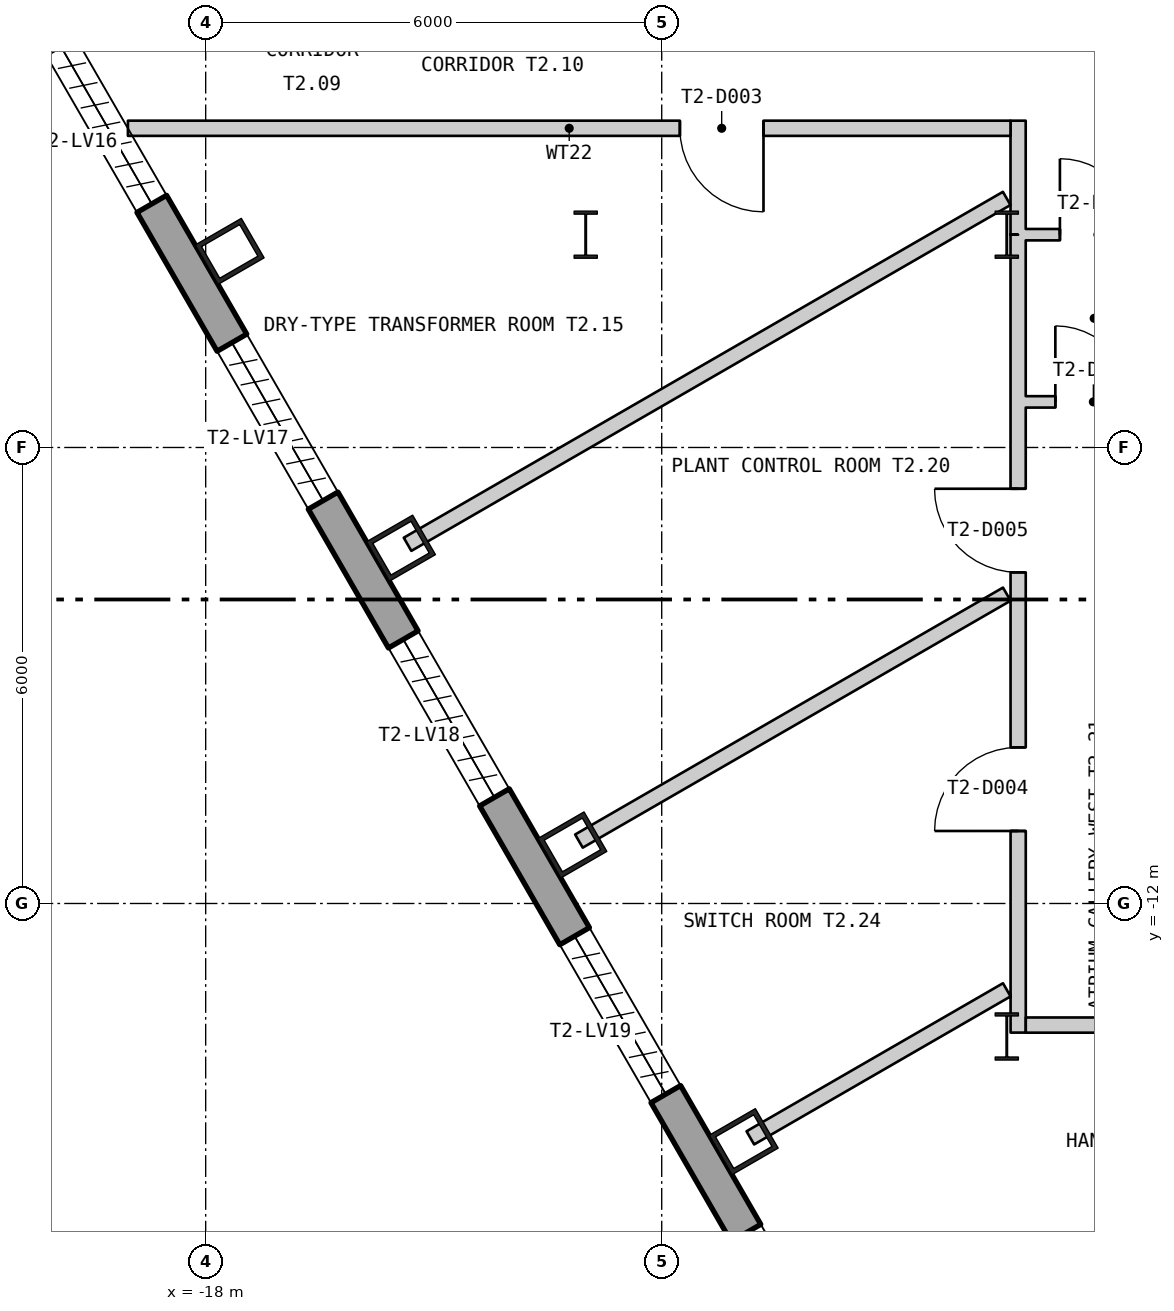
"""IFC4 building model, lengths in metres.
Left out: names, types, materials, properties, quantities, classifications, styles, units other than length and angle.
Written with IfcOpenShell. Run it as: python <this file> out.ifc"""

import sys

from ifc_helpers import new_model, si_unit, direction, frame, frame_2d, origin, origin_2d, place, context, subcontext, project, spatial, polyline, rectangle, hollow_rectangle, i_section, outline, extrude, element, fill, save


model = new_model("IFC4")
c1 = context("Model", 3, precision=1e-05, world=origin(), true_north=direction((0.0, 1.0)))
c2 = subcontext(c1, "Body", "Model", "MODEL_VIEW")
j1 = project(units=[si_unit("LENGTHUNIT", "METRE"), si_unit("PLANEANGLEUNIT", "RADIAN")], contexts=[c1])
p1 = place(None, origin())
s1 = spatial("IfcSite", under=j1, at=p1, CompositionType="ELEMENT")
p2 = place(p1, origin())
s2 = spatial("IfcBuilding", under=s1, at=p2, CompositionType="ELEMENT")
p3 = place(p2, frame((0.0, 0.0, 133.8)))
s3 = spatial("IfcBuildingStorey", under=s2, at=p3, CompositionType="ELEMENT", Elevation=133.8)
for number, where, z_axis, x_axis in (
    (1, (-17.684, -3.42, 0.0), (0.0, 0.0, 1.0), (0.5, -0.866, 0.0)),
    (2, (-15.43, -7.325, 0.0), (0.0, 0.0, 1.0), (0.5, -0.866, 0.0)),
    (3, (-13.175, -11.23, 0.0), (0.0, 0.0, 1.0), (0.5, -0.866, 0.0)),
    (4, (-10.921, -15.134, 0.0), (0.0, 0.0, 1.0), (0.5, -0.866, 0.0)),
):
    element("IfcColumn", number, at=place(p3, frame(where, z_axis=z_axis, x_axis=x_axis)), inside=s3, PredefinedType="COLUMN", context=c2, shape_type="SweptSolid", body=[
        extrude(hollow_rectangle(XDim=0.6, YDim=0.7, WallThickness=0.06, at=origin_2d()), origin(), (0.0, 0.0, 1.0), 6.0),
    ])
for number, where, z_axis, x_axis in (
    (5, (-7.46, -3.2, 0.0), (0.0, 0.0, 1.0), (1.0, 0.0, 0.0)),
    (6, (-7.46, -13.75, 0.0), (0.0, 0.0, 1.0), (1.0, 0.0, 0.0)),
    (7, (-13.0, -3.2, 0.0), (0.0, 0.0, 1.0), (1.0, 0.0, 0.0)),
):
    element("IfcColumn", number, at=place(p3, frame(where, z_axis=z_axis, x_axis=x_axis)), inside=s3, PredefinedType="COLUMN", context=c2, shape_type="SweptSolid", body=[
        extrude(i_section(OverallWidth=0.305, OverallDepth=0.62, WebThickness=0.021, FlangeThickness=0.04, at=origin_2d()), origin(), (0.0, 0.0, 1.0), 6.0),
    ])
p4 = place(p3, frame((-27.365, 12.198, -0.18), z_axis=(0.0, 0.0, 1.0), x_axis=(0.500000335318, -0.866025210188, 0.0)))
e8 = element("IfcWall", 8, at=p4, inside=s3, PredefinedType="SOLIDWALL", context=c2, shape_type="SweptSolid", body=[
    extrude(outline(polyline([(-0.13, -0.225), (45.88, -0.225), (45.62, 0.225), (0.13, 0.225), (-0.13, -0.225)])), origin(), (0.0, 0.0, 1.0), 6.0),
])
p5 = place(p4, frame((1.425, 0.0, 1.38)))
e9 = element("IfcOpeningElement", 9, at=p5, cuts=e8, PredefinedType="OPENING", context=c2, shape_type="SweptSolid", body=[
    extrude(rectangle(XDim=2.4, YDim=3.6, at=frame_2d((1.2, 1.8))), frame((0.0, 0.235, 0.0), z_axis=(0.0, -1.0, 0.0), x_axis=(1.0, 0.0, 0.0)), (0.0, 0.0, 1.0), 0.47),
])
p6 = place(p4, frame((5.895, 0.0, 1.38)))
e10 = element("IfcOpeningElement", 10, at=p6, cuts=e8, PredefinedType="OPENING", context=c2, shape_type="SweptSolid", body=[
    extrude(rectangle(XDim=2.4, YDim=3.6, at=frame_2d((1.2, 1.8))), frame((0.0, 0.235, 0.0), z_axis=(0.0, -1.0, 0.0), x_axis=(1.0, 0.0, 0.0)), (0.0, 0.0, 1.0), 0.47),
])
p7 = place(p4, frame((10.403, 0.0, 1.38)))
e11 = element("IfcOpeningElement", 11, at=p7, cuts=e8, PredefinedType="OPENING", context=c2, shape_type="SweptSolid", body=[
    extrude(rectangle(XDim=2.4, YDim=3.6, at=frame_2d((1.2, 1.8))), frame((0.0, 0.235, 0.0), z_axis=(0.0, -1.0, 0.0), x_axis=(1.0, 0.0, 0.0)), (0.0, 0.0, 1.0), 0.47),
])
p8 = place(p4, frame((14.912, 0.0, 1.38)))
e12 = element("IfcOpeningElement", 12, at=p8, cuts=e8, PredefinedType="OPENING", context=c2, shape_type="SweptSolid", body=[
    extrude(rectangle(XDim=2.4, YDim=3.6, at=frame_2d((1.2, 1.8))), frame((0.0, 0.235, 0.0), z_axis=(0.0, -1.0, 0.0), x_axis=(1.0, 0.0, 0.0)), (0.0, 0.0, 1.0), 0.47),
])
p9 = place(p4, frame((19.421, 0.0, 1.38)))
e13 = element("IfcOpeningElement", 13, at=p9, cuts=e8, PredefinedType="OPENING", context=c2, shape_type="SweptSolid", body=[
    extrude(rectangle(XDim=2.4, YDim=3.6, at=frame_2d((1.2, 1.8))), frame((0.0, 0.235, 0.0), z_axis=(0.0, -1.0, 0.0), x_axis=(1.0, 0.0, 0.0)), (0.0, 0.0, 1.0), 0.47),
])
p10 = place(p4, frame((23.929, 0.0, 1.38)))
e14 = element("IfcOpeningElement", 14, at=p10, cuts=e8, PredefinedType="OPENING", context=c2, shape_type="SweptSolid", body=[
    extrude(rectangle(XDim=2.4, YDim=3.6, at=frame_2d((1.2, 1.8))), frame((0.0, 0.235, 0.0), z_axis=(0.0, -1.0, 0.0), x_axis=(1.0, 0.0, 0.0)), (0.0, 0.0, 1.0), 0.47),
])
p11 = place(p4, frame((28.438, 0.0, 1.38)))
e15 = element("IfcOpeningElement", 15, at=p11, cuts=e8, PredefinedType="OPENING", context=c2, shape_type="SweptSolid", body=[
    extrude(rectangle(XDim=2.4, YDim=3.6, at=frame_2d((1.2, 1.8))), frame((0.0, 0.235, 0.0), z_axis=(0.0, -1.0, 0.0), x_axis=(1.0, 0.0, 0.0)), (0.0, 0.0, 1.0), 0.47),
])
p12 = place(p4, frame((32.947, 0.0, 1.38)))
e16 = element("IfcOpeningElement", 16, at=p12, cuts=e8, PredefinedType="OPENING", context=c2, shape_type="SweptSolid", body=[
    extrude(rectangle(XDim=2.4, YDim=3.6, at=frame_2d((1.2, 1.8))), frame((0.0, 0.235, 0.0), z_axis=(0.0, -1.0, 0.0), x_axis=(1.0, 0.0, 0.0)), (0.0, 0.0, 1.0), 0.47),
])
p13 = place(p4, frame((37.455, 0.0, 1.38)))
e17 = element("IfcOpeningElement", 17, at=p13, cuts=e8, PredefinedType="OPENING", context=c2, shape_type="SweptSolid", body=[
    extrude(rectangle(XDim=2.4, YDim=3.6, at=frame_2d((1.2, 1.8))), frame((0.0, 0.235, 0.0), z_axis=(0.0, -1.0, 0.0), x_axis=(1.0, 0.0, 0.0)), (0.0, 0.0, 1.0), 0.47),
])
p14 = place(p4, frame((41.925, 0.0, 1.38)))
e18 = element("IfcOpeningElement", 18, at=p14, cuts=e8, PredefinedType="OPENING", context=c2, shape_type="SweptSolid", body=[
    extrude(rectangle(XDim=2.4, YDim=3.6, at=frame_2d((1.2, 1.8))), frame((0.0, 0.235, 0.0), z_axis=(0.0, -1.0, 0.0), x_axis=(1.0, 0.0, 0.0)), (0.0, 0.0, 1.0), 0.47),
])
p15 = place(p3, frame((-19.023, -1.8, 0.0), z_axis=(0.0, 0.0, 1.0), x_axis=(1.0, 0.0, 0.0)))
e19 = element("IfcWall", 19, at=p15, inside=s3, PredefinedType="PARTITIONING", context=c2, shape_type="SweptSolid", body=[
    extrude(rectangle(XDim=11.612, YDim=0.2, at=frame_2d((5.806, 0.0))), origin(), (0.0, 0.0, 1.0), 5.8),
])
p16 = place(p15, frame((7.262, 0.0, 0.0)))
e20 = element("IfcOpeningElement", 20, at=p16, cuts=e19, PredefinedType="OPENING", context=c2, shape_type="SweptSolid", body=[
    extrude(rectangle(XDim=1.1, YDim=2.1, at=frame_2d((0.55, 1.05))), frame((0.0, 0.11, 0.0), z_axis=(0.0, -1.0, 0.0), x_axis=(1.0, 0.0, 0.0)), (0.0, 0.0, 1.0), 0.22),
])
p17 = place(p3, frame((-15.344, -7.274, 0.0), z_axis=(0.0, 0.0, 1.0), x_axis=(0.866037399706, 0.499979221878, 0.0)))
e21 = element("IfcWall", 21, at=p17, inside=s3, PredefinedType="PARTITIONING", context=c2, shape_type="SweptSolid", body=[
    extrude(rectangle(XDim=9.102, YDim=0.2, at=frame_2d((4.551, 0.0))), origin(), (0.0, 0.0, 1.0), 5.8),
])
p18 = place(p3, frame((-13.089, -11.179, 0.0), z_axis=(0.0, 0.0, 1.0), x_axis=(0.866085669847, 0.499895601587, 0.0)))
e22 = element("IfcWall", 22, at=p18, inside=s3, PredefinedType="PARTITIONING", context=c2, shape_type="SweptSolid", body=[
    extrude(rectangle(XDim=6.499, YDim=0.2, at=frame_2d((3.25, 0.0))), origin(), (0.0, 0.0, 1.0), 5.8),
])
p19 = place(p3, frame((-10.834, -15.084, 0.0), z_axis=(0.0, 0.0, 1.0), x_axis=(0.866023159588, 0.500003887042, 0.0)))
e23 = element("IfcWall", 23, at=p19, inside=s3, PredefinedType="PARTITIONING", context=c2, shape_type="SweptSolid", body=[
    extrude(rectangle(XDim=3.896, YDim=0.2, at=frame_2d((1.948, 0.0))), origin(), (0.0, 0.0, 1.0), 5.8),
])
p20 = place(p3, frame((-7.31, -13.699, 0.0), z_axis=(0.0, 0.0, 1.0), x_axis=(-8.5722449e-05, 0.999999996326, 0.0)))
e24 = element("IfcWall", 24, at=p20, inside=s3, PredefinedType="PARTITIONING", context=c2, shape_type="SweptSolid", body=[
    extrude(rectangle(XDim=10.499, YDim=0.2, at=frame_2d((5.25, 0.0))), origin(), (0.0, 0.0, 1.0), 5.21),
])
p21 = place(p20, frame((2.653, 0.0, 0.0)))
e25 = element("IfcOpeningElement", 25, at=p21, cuts=e24, PredefinedType="OPENING", context=c2, shape_type="SweptSolid", body=[
    extrude(rectangle(XDim=1.1, YDim=2.1, at=frame_2d((0.55, 1.05))), frame((0.0, 0.11, 0.0), z_axis=(0.0, -1.0, 0.0), x_axis=(1.0, 0.0, 0.0)), (0.0, 0.0, 1.0), 0.22),
])
p22 = place(p20, frame((6.056, 0.0, 0.0)))
e26 = element("IfcOpeningElement", 26, at=p22, cuts=e24, PredefinedType="OPENING", context=c2, shape_type="SweptSolid", body=[
    extrude(rectangle(XDim=1.1, YDim=2.1, at=frame_2d((0.55, 1.05))), frame((0.0, 0.11, 0.0), z_axis=(0.0, -1.0, 0.0), x_axis=(1.0, 0.0, 0.0)), (0.0, 0.0, 1.0), 0.22),
])
p23 = place(p3, frame((-7.311, -3.2, 0.0), z_axis=(0.0, 0.0, 1.0), x_axis=(-6.6666667e-05, 0.999999997778, 0.0)))
e27 = element("IfcWall", 27, at=p23, inside=s3, PredefinedType="PARTITIONING", context=c2, shape_type="SweptSolid", body=[
    extrude(rectangle(XDim=1.5, YDim=0.2, at=frame_2d((0.75, 0.0))), origin(), (0.0, 0.0, 1.0), 5.8),
])
p24 = place(p3, frame((-7.211, -3.2, 0.0), z_axis=(0.0, 0.0, 1.0), x_axis=(1.0, 0.0, 0.0)))
e28 = element("IfcWall", 28, at=p24, inside=s3, PredefinedType="PARTITIONING", context=c2, shape_type="SweptSolid", body=[
    extrude(rectangle(XDim=1.975, YDim=0.15, at=frame_2d((0.988, 0.0))), origin(), (0.0, 0.0, 1.0), 4.89),
])
p25 = place(p24, frame((0.45, 0.0, 0.0)))
e29 = element("IfcOpeningElement", 29, at=p25, cuts=e28, PredefinedType="OPENING", context=c2, shape_type="SweptSolid", body=[
    extrude(rectangle(XDim=1.0, YDim=2.1, at=frame_2d((0.5, 1.05))), frame((0.0, 0.085, 0.0), z_axis=(0.0, -1.0, 0.0), x_axis=(1.0, 0.0, 0.0)), (0.0, 0.0, 1.0), 0.17),
])
p26 = place(p3, frame((-7.211, -5.4, 0.0), z_axis=(0.0, 0.0, 1.0), x_axis=(1.0, 0.0, 0.0)))
e30 = element("IfcWall", 30, at=p26, inside=s3, PredefinedType="PARTITIONING", context=c2, shape_type="SweptSolid", body=[
    extrude(rectangle(XDim=1.781, YDim=0.15, at=frame_2d((0.89, 0.0))), origin(), (0.0, 0.0, 1.0), 5.8),
])
p27 = place(p26, frame((0.39, 0.0, 0.0)))
e31 = element("IfcOpeningElement", 31, at=p27, cuts=e30, PredefinedType="OPENING", context=c2, shape_type="SweptSolid", body=[
    extrude(rectangle(XDim=1.0, YDim=2.1, at=frame_2d((0.5, 1.05))), frame((0.0, 0.085, 0.0), z_axis=(0.0, -1.0, 0.0), x_axis=(1.0, 0.0, 0.0)), (0.0, 0.0, 1.0), 0.17),
])
p28 = place(p3, frame((-7.21, -13.6, 0.0), z_axis=(0.0, 0.0, 1.0), x_axis=(1.0, 0.0, 0.0)))
e32 = element("IfcWall", 32, at=p28, inside=s3, PredefinedType="PARTITIONING", context=c2, shape_type="SweptSolid", body=[
    extrude(rectangle(XDim=5.51, YDim=0.2, at=frame_2d((2.755, 0.0))), origin(), (0.0, 0.0, 1.0), 4.89),
])
p29 = place(p28, frame((3.098, 0.0, 0.0)))
e33 = element("IfcOpeningElement", 33, at=p29, cuts=e32, PredefinedType="OPENING", context=c2, shape_type="SweptSolid", body=[
    extrude(rectangle(XDim=1.1, YDim=2.1, at=frame_2d((0.55, 1.05))), frame((0.0, 0.11, 0.0), z_axis=(0.0, -1.0, 0.0), x_axis=(1.0, 0.0, 0.0)), (0.0, 0.0, 1.0), 0.22),
])
p30 = place(p16, origin())
e34 = element("IfcDoor", 34, at=p30, inside=s3, OperationType="SINGLE_SWING_RIGHT", PredefinedType="DOOR", context=c2, shape_type="SweptSolid", body=[
    extrude(rectangle(XDim=1.1, YDim=2.1, at=frame_2d((0.55, 1.05))), frame((0.0, 0.025, 0.0), z_axis=(0.0, -1.0, 0.0), x_axis=(1.0, 0.0, 0.0)), (0.0, 0.0, 1.0), 0.05),
])
fill(e20, e34)
p31 = place(p21, origin())
e35 = element("IfcDoor", 35, at=p31, inside=s3, OperationType="SINGLE_SWING_RIGHT", PredefinedType="DOOR", context=c2, shape_type="SweptSolid", body=[
    extrude(rectangle(XDim=1.1, YDim=2.1, at=frame_2d((0.55, 1.05))), frame((0.0, 0.025, 0.0), z_axis=(0.0, -1.0, 0.0), x_axis=(1.0, 0.0, 0.0)), (0.0, 0.0, 1.0), 0.05),
])
fill(e25, e35)
p32 = place(p22, origin())
e36 = element("IfcDoor", 36, at=p32, inside=s3, OperationType="SINGLE_SWING_LEFT", PredefinedType="DOOR", context=c2, shape_type="SweptSolid", body=[
    extrude(rectangle(XDim=1.1, YDim=2.1, at=frame_2d((0.55, 1.05))), frame((0.0, 0.025, 0.0), z_axis=(0.0, -1.0, 0.0), x_axis=(1.0, 0.0, 0.0)), (0.0, 0.0, 1.0), 0.05),
])
fill(e26, e36)
p33 = place(p25, origin())
e37 = element("IfcDoor", 37, at=p33, inside=s3, OperationType="SINGLE_SWING_RIGHT", PredefinedType="DOOR", context=c2, shape_type="SweptSolid", body=[
    extrude(rectangle(XDim=1.0, YDim=2.1, at=frame_2d((0.5, 1.05))), frame((0.0, 0.025, 0.0), z_axis=(0.0, -1.0, 0.0), x_axis=(1.0, 0.0, 0.0)), (0.0, 0.0, 1.0), 0.05),
])
fill(e29, e37)
p34 = place(p27, origin())
e38 = element("IfcDoor", 38, at=p34, inside=s3, OperationType="SINGLE_SWING_RIGHT", PredefinedType="DOOR", context=c2, shape_type="SweptSolid", body=[
    extrude(rectangle(XDim=1.0, YDim=2.1, at=frame_2d((0.5, 1.05))), frame((0.0, 0.025, 0.0), z_axis=(0.0, -1.0, 0.0), x_axis=(1.0, 0.0, 0.0)), (0.0, 0.0, 1.0), 0.05),
])
fill(e31, e38)
save(model, sys.argv[1])
